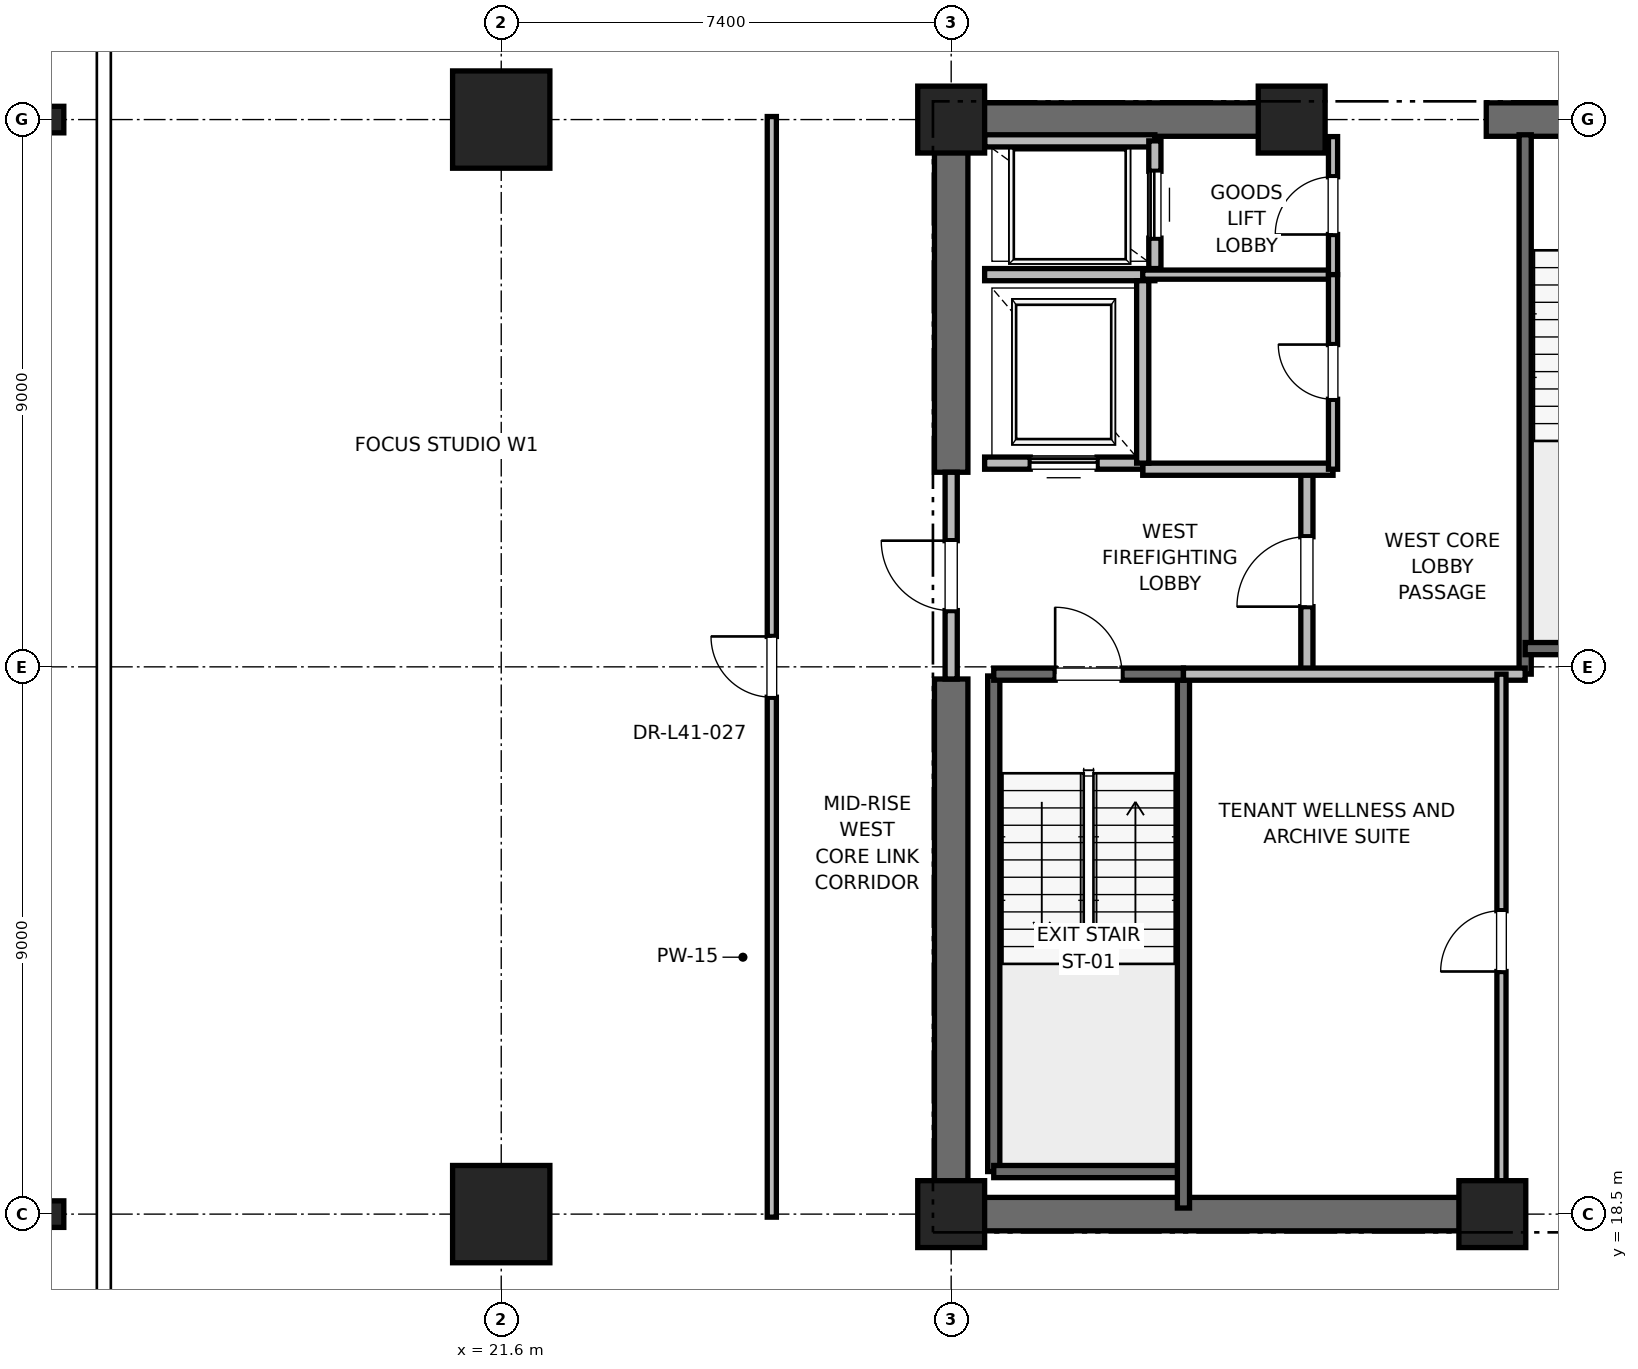
"""IFC4 building model, lengths in metres.
Left out: names, types, materials, properties, quantities, classifications, styles, units other than length and angle.
Written with IfcOpenShell. Run it as: python <this file> out.ifc"""

import sys

from ifc_helpers import new_model, si_unit, direction, frame, frame_2d, origin, origin_2d, place, context, subcontext, project, spatial, rectangle, i_section, extrude, element, fill, save


model = new_model("IFC4")
c1 = context("Model", 3, precision=1e-05, world=origin(), true_north=direction((0.0, 1.0)))
c2 = subcontext(c1, "Body", "Model", "MODEL_VIEW")
j1 = project(units=[si_unit("LENGTHUNIT", "METRE"), si_unit("PLANEANGLEUNIT", "RADIAN")], contexts=[c1])
p1 = place(None, origin())
s1 = spatial("IfcSite", under=j1, at=p1, CompositionType="ELEMENT")
p2 = place(p1, origin())
s2 = spatial("IfcBuilding", under=s1, at=p2, CompositionType="ELEMENT")
p3 = place(p2, frame((0.0, 0.0, 176.4)))
s3 = spatial("IfcBuildingStorey", under=s2, at=p3, CompositionType="ELEMENT", Elevation=176.4)
for number, where, z_axis, x_axis in (
    (1, (21.6, 18.5, 0.0), (0.0, 0.0, 1.0), (1.0, 0.0, 0.0)),
    (2, (21.6, 36.5, 0.0), (0.0, 0.0, 1.0), (1.0, 0.0, 0.0)),
):
    element("IfcColumn", number, at=place(p3, frame(where, z_axis=z_axis, x_axis=x_axis)), inside=s3, PredefinedType="COLUMN", context=c2, shape_type="SweptSolid", body=[
        extrude(rectangle(XDim=1.6, YDim=1.6, at=origin_2d()), origin(), (0.0, 0.0, 1.0), 4.0),
    ])
for number, where, z_axis, x_axis in (
    (3, (14.2, 18.5, 0.0), (0.0, 0.0, 1.0), (1.0, 0.0, 0.0)),
    (4, (14.2, 36.5, 0.0), (0.0, 0.0, 1.0), (1.0, 0.0, 0.0)),
):
    element("IfcColumn", number, at=place(p3, frame(where, z_axis=z_axis, x_axis=x_axis)), inside=s3, PredefinedType="COLUMN", context=c2, shape_type="SweptSolid", body=[
        extrude(i_section(OverallWidth=0.412, OverallDepth=0.437, WebThickness=0.036, FlangeThickness=0.058, FilletRadius=0.015, at=origin_2d()), origin(), (0.0, 0.0, 1.0), 4.0),
    ])
for number, where, z_axis, x_axis in (
    (5, (29.0, 18.5, 0.0), (0.0, 0.0, 1.0), (1.0, 0.0, 0.0)),
    (6, (29.0, 36.5, 0.0), (0.0, 0.0, 1.0), (1.0, 0.0, 0.0)),
    (7, (37.9, 18.5, 0.0), (0.0, 0.0, 1.0), (1.0, 0.0, 0.0)),
    (8, (34.6, 36.5, 0.0), (0.0, 0.0, 1.0), (1.0, 0.0, 0.0)),
):
    element("IfcColumn", number, at=place(p3, frame(where, z_axis=z_axis, x_axis=x_axis)), inside=s3, PredefinedType="PILASTER", context=c2, shape_type="SweptSolid", body=[
        extrude(rectangle(XDim=1.1, YDim=1.1, at=origin_2d()), origin(), (0.0, 0.0, 1.0), 4.0),
    ])
p4 = place(p3, frame((29.0, 18.5, 0.0), z_axis=(0.0, 0.0, 1.0), x_axis=(1.0, 0.0, 0.0)))
e9 = element("IfcWall", 9, at=p4, inside=s3, PredefinedType="SHEAR", context=c2, shape_type="SweptSolid", body=[
    extrude(rectangle(XDim=9.2, YDim=0.55, at=frame_2d((4.6, 0.0))), origin(), (0.0, 0.0, 1.0), 3.775),
])
p5 = place(p3, frame((29.0, 36.5, 0.0), z_axis=(0.0, 0.0, 1.0), x_axis=(1.0, 0.0, 0.0)))
e10 = element("IfcWall", 10, at=p5, inside=s3, PredefinedType="SHEAR", context=c2, shape_type="SweptSolid", body=[
    extrude(rectangle(XDim=5.8, YDim=0.55, at=frame_2d((2.9, 0.0))), origin(), (0.0, 0.0, 1.0), 3.775),
])
p6 = place(p3, frame((37.8, 36.5, 0.0), z_axis=(0.0, 0.0, 1.0), x_axis=(1.0, 0.0, 0.0)))
e11 = element("IfcWall", 11, at=p6, inside=s3, PredefinedType="SHEAR", context=c2, shape_type="SweptSolid", body=[
    extrude(rectangle(XDim=4.4, YDim=0.55, at=frame_2d((2.2, 0.0))), origin(), (0.0, 0.0, 1.0), 3.775),
])
p7 = place(p6, frame((1.65, 0.0, 0.0)))
e12 = element("IfcOpeningElement", 12, at=p7, cuts=e11, PredefinedType="OPENING", context=c2, shape_type="SweptSolid", body=[
    extrude(rectangle(XDim=1.1, YDim=2.15, at=frame_2d((0.55, 1.075))), frame((0.0, 0.275, 0.0), z_axis=(0.0, -1.0, 0.0), x_axis=(1.0, 0.0, 0.0)), (0.0, 0.0, 1.0), 0.55),
])
p8 = place(p3, frame((29.0, 18.5, 0.0), z_axis=(0.0, 0.0, 1.0), x_axis=(0.0, 1.0, 0.0)))
e13 = element("IfcWall", 13, at=p8, inside=s3, PredefinedType="SHEAR", context=c2, shape_type="SweptSolid", body=[
    extrude(rectangle(XDim=8.8, YDim=0.55, at=frame_2d((4.4, 0.0))), origin(), (0.0, 0.0, 1.0), 3.775),
])
p9 = place(p3, frame((29.0, 30.7, 0.0), z_axis=(0.0, 0.0, 1.0), x_axis=(0.0, 1.0, 0.0)))
e14 = element("IfcWall", 14, at=p9, inside=s3, PredefinedType="SHEAR", context=c2, shape_type="SweptSolid", body=[
    extrude(rectangle(XDim=5.8, YDim=0.55, at=frame_2d((2.9, 0.0))), origin(), (0.0, 0.0, 1.0), 3.775),
])
p10 = place(p3, frame((29.7, 19.2, 0.0), z_axis=(0.0, 0.0, 1.0), x_axis=(0.0, 1.0, 0.0)))
e15 = element("IfcWall", 15, at=p10, inside=s3, PredefinedType="SOLIDWALL", context=c2, shape_type="SweptSolid", body=[
    extrude(rectangle(XDim=8.15, YDim=0.2, at=frame_2d((4.075, 0.0))), origin(), (0.0, 0.0, 1.0), 3.775),
])
p11 = place(p3, frame((29.7, 19.2, 0.0), z_axis=(0.0, 0.0, 1.0), x_axis=(1.0, 0.0, 0.0)))
e16 = element("IfcWall", 16, at=p11, inside=s3, PredefinedType="SOLIDWALL", context=c2, shape_type="SweptSolid", body=[
    extrude(rectangle(XDim=3.12, YDim=0.2, at=frame_2d((1.56, 0.0))), origin(), (0.0, 0.0, 1.0), 3.775),
])
p12 = place(p3, frame((32.82, 18.6, 0.0), z_axis=(0.0, 0.0, 1.0), x_axis=(0.0, 1.0, 0.0)))
e17 = element("IfcWall", 17, at=p12, inside=s3, PredefinedType="SOLIDWALL", context=c2, shape_type="SweptSolid", body=[
    extrude(rectangle(XDim=8.78, YDim=0.2, at=frame_2d((4.39, 0.0))), origin(), (0.0, 0.0, 1.0), 3.775),
])
p13 = place(p3, frame((29.7, 27.38, 0.0), z_axis=(0.0, 0.0, 1.0), x_axis=(1.0, 0.0, 0.0)))
e18 = element("IfcWall", 18, at=p13, inside=s3, PredefinedType="SOLIDWALL", context=c2, shape_type="SweptSolid", body=[
    extrude(rectangle(XDim=3.12, YDim=0.2, at=frame_2d((1.56, 0.0))), origin(), (0.0, 0.0, 1.0), 3.775),
])
p14 = place(p13, frame((1.01, 0.0, 0.0)))
e19 = element("IfcOpeningElement", 19, at=p14, cuts=e18, PredefinedType="OPENING", context=c2, shape_type="SweptSolid", body=[
    extrude(rectangle(XDim=1.1, YDim=2.15, at=frame_2d((0.55, 1.075))), frame((0.0, 0.1, 0.0), z_axis=(0.0, -1.0, 0.0), x_axis=(1.0, 0.0, 0.0)), (0.0, 0.0, 1.0), 0.2),
])
p15 = place(p3, frame((38.44, 27.38, 0.0), z_axis=(0.0, 0.0, 1.0), x_axis=(0.0, 1.0, 0.0)))
e20 = element("IfcWall", 20, at=p15, inside=s3, PredefinedType="SOLIDWALL", context=c2, shape_type="SweptSolid", body=[
    extrude(rectangle(XDim=8.87, YDim=0.2, at=frame_2d((4.435, 0.0))), origin(), (0.0, 0.0, 1.0), 3.775),
])
p16 = place(p3, frame((38.44, 27.8, 0.0), z_axis=(0.0, 0.0, 1.0), x_axis=(1.0, 0.0, 0.0)))
e21 = element("IfcWall", 21, at=p16, inside=s3, PredefinedType="SOLIDWALL", context=c2, shape_type="SweptSolid", body=[
    extrude(rectangle(XDim=3.32, YDim=0.2, at=frame_2d((1.66, 0.0))), origin(), (0.0, 0.0, 1.0), 3.775),
])
p17 = place(p3, frame((34.85, 27.38, 0.0), z_axis=(0.0, 0.0, 1.0), x_axis=(0.0, 1.0, 0.0)))
e22 = element("IfcWall", 22, at=p17, inside=s3, PredefinedType="PARTITIONING", context=c2, shape_type="SweptSolid", body=[
    extrude(rectangle(XDim=3.37, YDim=0.2, at=frame_2d((1.685, 0.0))), origin(), (0.0, 0.0, 1.0), 3.775),
])
p18 = place(p17, frame((1.11, 0.0, 0.0)))
e23 = element("IfcOpeningElement", 23, at=p18, cuts=e22, PredefinedType="OPENING", context=c2, shape_type="SweptSolid", body=[
    extrude(rectangle(XDim=1.15, YDim=2.2, at=frame_2d((0.575, 1.1))), frame((0.0, 0.1, 0.0), z_axis=(0.0, -1.0, 0.0), x_axis=(1.0, 0.0, 0.0)), (0.0, 0.0, 1.0), 0.2),
])
p19 = place(p3, frame((29.0, 27.3, 0.0), z_axis=(0.0, 0.0, 1.0), x_axis=(0.0, 1.0, 0.0)))
e24 = element("IfcWall", 24, at=p19, inside=s3, PredefinedType="PARTITIONING", context=c2, shape_type="SweptSolid", body=[
    extrude(rectangle(XDim=3.4, YDim=0.2, at=frame_2d((1.7, 0.0))), origin(), (0.0, 0.0, 1.0), 2.755),
])
p20 = place(p19, frame((1.125, 0.0, 0.0)))
e25 = element("IfcOpeningElement", 25, at=p20, cuts=e24, PredefinedType="OPENING", context=c2, shape_type="SweptSolid", body=[
    extrude(rectangle(XDim=1.15, YDim=2.2, at=frame_2d((0.575, 1.1))), frame((0.0, 0.1, 0.0), z_axis=(0.0, -1.0, 0.0), x_axis=(1.0, 0.0, 0.0)), (0.0, 0.0, 1.0), 0.2),
])
p21 = place(p3, frame((32.82, 27.38, 0.0), z_axis=(0.0, 0.0, 1.0), x_axis=(1.0, 0.0, 0.0)))
e26 = element("IfcWall", 26, at=p21, inside=s3, PredefinedType="PARTITIONING", context=c2, shape_type="SweptSolid", body=[
    extrude(rectangle(XDim=5.62, YDim=0.2, at=frame_2d((2.81, 0.0))), origin(), (0.0, 0.0, 1.0), 3.775),
])
p22 = place(p3, frame((32.15, 30.75, 0.0), z_axis=(0.0, 0.0, 1.0), x_axis=(1.0, 0.0, 0.0)))
e27 = element("IfcWall", 27, at=p22, inside=s3, PredefinedType="PARTITIONING", context=c2, shape_type="SweptSolid", body=[
    extrude(rectangle(XDim=3.13, YDim=0.2, at=frame_2d((1.565, 0.0))), origin(), (0.0, 0.0, 1.0), 3.775),
])
p23 = place(p3, frame((29.55, 30.85, 0.0), z_axis=(0.0, 0.0, 1.0), x_axis=(1.0, 0.0, 0.0)))
e28 = element("IfcWall", 28, at=p23, inside=s3, PredefinedType="SOLIDWALL", context=c2, shape_type="SweptSolid", body=[
    extrude(rectangle(XDim=2.6, YDim=0.2, at=frame_2d((1.3, 0.0))), origin(), (0.0, 0.0, 1.0), 2.755),
])
p24 = place(p23, frame((0.75, 0.0, 0.0)))
e29 = element("IfcOpeningElement", 29, at=p24, cuts=e28, PredefinedType="OPENING", context=c2, shape_type="SweptSolid", body=[
    extrude(rectangle(XDim=1.1, YDim=2.2, at=frame_2d((0.55, 1.1))), frame((0.0, 0.1, 0.0), z_axis=(0.0, -1.0, 0.0), x_axis=(1.0, 0.0, 0.0)), (0.0, 0.0, 1.0), 0.2),
])
p25 = place(p3, frame((29.55, 33.95, 0.0), z_axis=(0.0, 0.0, 1.0), x_axis=(1.0, 0.0, 0.0)))
e30 = element("IfcWall", 30, at=p25, inside=s3, PredefinedType="SOLIDWALL", context=c2, shape_type="SweptSolid", body=[
    extrude(rectangle(XDim=2.8, YDim=0.2, at=frame_2d((1.4, 0.0))), origin(), (0.0, 0.0, 1.0), 3.775),
])
p26 = place(p3, frame((32.15, 30.85, 0.0), z_axis=(0.0, 0.0, 1.0), x_axis=(0.0, 1.0, 0.0)))
e31 = element("IfcWall", 31, at=p26, inside=s3, PredefinedType="SOLIDWALL", context=c2, shape_type="SweptSolid", body=[
    extrude(rectangle(XDim=3.0, YDim=0.2, at=frame_2d((1.5, 0.0))), origin(), (0.0, 0.0, 1.0), 3.775),
])
p27 = place(p3, frame((32.35, 36.15, 0.0), z_axis=(0.0, 0.0, 1.0), x_axis=(-1.0, 0.0, 0.0)))
e32 = element("IfcWall", 32, at=p27, inside=s3, PredefinedType="SOLIDWALL", context=c2, shape_type="SweptSolid", body=[
    extrude(rectangle(XDim=2.8, YDim=0.2, at=frame_2d((1.4, 0.0))), origin(), (0.0, 0.0, 1.0), 2.985),
])
p28 = place(p3, frame((32.35, 34.05, 0.0), z_axis=(0.0, 0.0, 1.0), x_axis=(0.0, 1.0, 0.0)))
e33 = element("IfcWall", 33, at=p28, inside=s3, PredefinedType="SOLIDWALL", context=c2, shape_type="SweptSolid", body=[
    extrude(rectangle(XDim=2.1, YDim=0.2, at=frame_2d((1.05, 0.0))), origin(), (0.0, 0.0, 1.0), 3.775),
])
p29 = place(p28, frame((0.5, 0.0, 0.0)))
e34 = element("IfcOpeningElement", 34, at=p29, cuts=e33, PredefinedType="OPENING", context=c2, shape_type="SweptSolid", body=[
    extrude(rectangle(XDim=1.1, YDim=2.2, at=frame_2d((0.55, 1.1))), frame((0.0, 0.1, 0.0), z_axis=(0.0, -1.0, 0.0), x_axis=(1.0, 0.0, 0.0)), (0.0, 0.0, 1.0), 0.2),
])
p30 = place(p3, frame((32.15, 33.95, 0.0), z_axis=(0.0, 0.0, 1.0), x_axis=(1.0, 0.0, 0.0)))
e35 = element("IfcWall", 35, at=p30, inside=s3, PredefinedType="PARTITIONING", context=c2, shape_type="SweptSolid", body=[
    extrude(rectangle(XDim=3.13, YDim=0.15, at=frame_2d((1.565, 0.0))), origin(), (0.0, 0.0, 1.0), 2.85),
])
p31 = place(p3, frame((35.28, 33.95, 0.0), z_axis=(0.0, 0.0, 1.0), x_axis=(0.0, 1.0, 0.0)))
e36 = element("IfcWall", 36, at=p31, inside=s3, PredefinedType="PARTITIONING", context=c2, shape_type="SweptSolid", body=[
    extrude(rectangle(XDim=2.27, YDim=0.15, at=frame_2d((1.135, 0.0))), origin(), (0.0, 0.0, 1.0), 2.755),
])
p32 = place(p31, frame((0.66, 0.0, 0.0)))
e37 = element("IfcOpeningElement", 37, at=p32, cuts=e36, PredefinedType="OPENING", context=c2, shape_type="SweptSolid", body=[
    extrude(rectangle(XDim=0.95, YDim=2.15, at=frame_2d((0.475, 1.075))), frame((0.0, 0.075, 0.0), z_axis=(0.0, -1.0, 0.0), x_axis=(1.0, 0.0, 0.0)), (0.0, 0.0, 1.0), 0.15),
])
p33 = place(p3, frame((35.28, 30.75, 0.0), z_axis=(0.0, 0.0, 1.0), x_axis=(0.0, 1.0, 0.0)))
e38 = element("IfcWall", 38, at=p33, inside=s3, PredefinedType="PARTITIONING", context=c2, shape_type="SweptSolid", body=[
    extrude(rectangle(XDim=3.2, YDim=0.15, at=frame_2d((1.6, 0.0))), origin(), (0.0, 0.0, 1.0), 2.85),
])
p34 = place(p33, frame((1.15, 0.0, 0.0)))
e39 = element("IfcOpeningElement", 39, at=p34, cuts=e38, PredefinedType="OPENING", context=c2, shape_type="SweptSolid", body=[
    extrude(rectangle(XDim=0.9, YDim=2.1, at=frame_2d((0.45, 1.05))), frame((0.0, 0.075, 0.0), z_axis=(0.0, -1.0, 0.0), x_axis=(1.0, 0.0, 0.0)), (0.0, 0.0, 1.0), 0.15),
])
p35 = place(p3, frame((38.05, 18.6, 0.0), z_axis=(0.0, 0.0, 1.0), x_axis=(0.0, 1.0, 0.0)))
e40 = element("IfcWall", 40, at=p35, inside=s3, PredefinedType="PARTITIONING", context=c2, shape_type="SweptSolid", body=[
    extrude(rectangle(XDim=8.78, YDim=0.15, at=frame_2d((4.39, 0.0))), origin(), (0.0, 0.0, 1.0), 2.755),
])
p36 = place(p35, frame((3.89, 0.0, 0.0)))
e41 = element("IfcOpeningElement", 41, at=p36, cuts=e40, PredefinedType="OPENING", context=c2, shape_type="SweptSolid", body=[
    extrude(rectangle(XDim=1.0, YDim=2.15, at=frame_2d((0.5, 1.075))), frame((0.0, 0.075, 0.0), z_axis=(0.0, -1.0, 0.0), x_axis=(1.0, 0.0, 0.0)), (0.0, 0.0, 1.0), 0.15),
])
p37 = place(p3, frame((26.05, 18.45, 0.0), z_axis=(0.0, 0.0, 1.0), x_axis=(0.0, 1.0, 0.0)))
e42 = element("IfcWall", 42, at=p37, inside=s3, PredefinedType="PARTITIONING", context=c2, shape_type="SweptSolid", body=[
    extrude(rectangle(XDim=18.1, YDim=0.15, at=frame_2d((9.05, 0.0))), origin(), (0.0, 0.0, 1.0), 2.85),
])
p38 = place(p37, frame((8.55, 0.0, 0.0)))
e43 = element("IfcOpeningElement", 43, at=p38, cuts=e42, PredefinedType="OPENING", context=c2, shape_type="SweptSolid", body=[
    extrude(rectangle(XDim=1.0, YDim=2.15, at=frame_2d((0.5, 1.075))), frame((0.0, 0.075, 0.0), z_axis=(0.0, -1.0, 0.0), x_axis=(1.0, 0.0, 0.0)), (0.0, 0.0, 1.0), 0.15),
])
p39 = place(p14, origin())
e44 = element("IfcDoor", 44, at=p39, inside=s3, OperationType="SINGLE_SWING_LEFT", PredefinedType="DOOR", context=c2, shape_type="SweptSolid", body=[
    extrude(rectangle(XDim=1.1, YDim=2.15, at=frame_2d((0.55, 1.075))), frame((0.0, 0.025, 0.0), z_axis=(0.0, -1.0, 0.0), x_axis=(1.0, 0.0, 0.0)), (0.0, 0.0, 1.0), 0.05),
])
fill(e19, e44)
p40 = place(p18, origin())
e45 = element("IfcDoor", 45, at=p40, inside=s3, OperationType="SINGLE_SWING_LEFT", PredefinedType="DOOR", context=c2, shape_type="SweptSolid", body=[
    extrude(rectangle(XDim=1.15, YDim=2.2, at=frame_2d((0.575, 1.1))), frame((0.0, 0.025, 0.0), z_axis=(0.0, -1.0, 0.0), x_axis=(1.0, 0.0, 0.0)), (0.0, 0.0, 1.0), 0.05),
])
fill(e23, e45)
p41 = place(p20, origin())
e46 = element("IfcDoor", 46, at=p41, inside=s3, OperationType="SINGLE_SWING_RIGHT", PredefinedType="DOOR", context=c2, shape_type="SweptSolid", body=[
    extrude(rectangle(XDim=1.15, YDim=2.2, at=frame_2d((0.575, 1.1))), frame((0.0, 0.025, 0.0), z_axis=(0.0, -1.0, 0.0), x_axis=(1.0, 0.0, 0.0)), (0.0, 0.0, 1.0), 0.05),
])
fill(e25, e46)
p42 = place(p24, origin())
e47 = element("IfcDoor", 47, at=p42, inside=s3, OperationType="SLIDING_TO_RIGHT", PredefinedType="DOOR", context=c2, shape_type="SweptSolid", body=[
    extrude(rectangle(XDim=1.1, YDim=2.2, at=frame_2d((0.55, 1.1))), frame((0.0, 0.025, 0.0), z_axis=(0.0, -1.0, 0.0), x_axis=(1.0, 0.0, 0.0)), (0.0, 0.0, 1.0), 0.05),
])
fill(e29, e47)
p43 = place(p29, origin())
e48 = element("IfcDoor", 48, at=p43, inside=s3, OperationType="SLIDING_TO_RIGHT", PredefinedType="DOOR", context=c2, shape_type="SweptSolid", body=[
    extrude(rectangle(XDim=1.1, YDim=2.2, at=frame_2d((0.55, 1.1))), frame((0.0, 0.025, 0.0), z_axis=(0.0, -1.0, 0.0), x_axis=(1.0, 0.0, 0.0)), (0.0, 0.0, 1.0), 0.05),
])
fill(e34, e48)
p44 = place(p32, origin())
e49 = element("IfcDoor", 49, at=p44, inside=s3, OperationType="SINGLE_SWING_LEFT", PredefinedType="DOOR", context=c2, shape_type="SweptSolid", body=[
    extrude(rectangle(XDim=0.95, YDim=2.15, at=frame_2d((0.475, 1.075))), frame((0.0, 0.025, 0.0), z_axis=(0.0, -1.0, 0.0), x_axis=(1.0, 0.0, 0.0)), (0.0, 0.0, 1.0), 0.05),
])
fill(e37, e49)
p45 = place(p34, origin())
e50 = element("IfcDoor", 50, at=p45, inside=s3, OperationType="SINGLE_SWING_RIGHT", PredefinedType="DOOR", context=c2, shape_type="SweptSolid", body=[
    extrude(rectangle(XDim=0.9, YDim=2.1, at=frame_2d((0.45, 1.05))), frame((0.0, 0.025, 0.0), z_axis=(0.0, -1.0, 0.0), x_axis=(1.0, 0.0, 0.0)), (0.0, 0.0, 1.0), 0.05),
])
fill(e39, e50)
p46 = place(p36, origin())
e51 = element("IfcDoor", 51, at=p46, inside=s3, OperationType="SINGLE_SWING_LEFT", PredefinedType="DOOR", context=c2, shape_type="SweptSolid", body=[
    extrude(rectangle(XDim=1.0, YDim=2.15, at=frame_2d((0.5, 1.075))), frame((0.0, 0.025, 0.0), z_axis=(0.0, -1.0, 0.0), x_axis=(1.0, 0.0, 0.0)), (0.0, 0.0, 1.0), 0.05),
])
fill(e41, e51)
p47 = place(p38, origin())
e52 = element("IfcDoor", 52, at=p47, inside=s3, OperationType="SINGLE_SWING_RIGHT", PredefinedType="DOOR", context=c2, shape_type="SweptSolid", body=[
    extrude(rectangle(XDim=1.0, YDim=2.15, at=frame_2d((0.5, 1.075))), frame((0.0, 0.025, 0.0), z_axis=(0.0, -1.0, 0.0), x_axis=(1.0, 0.0, 0.0)), (0.0, 0.0, 1.0), 0.05),
])
fill(e43, e52)
save(model, sys.argv[1])
